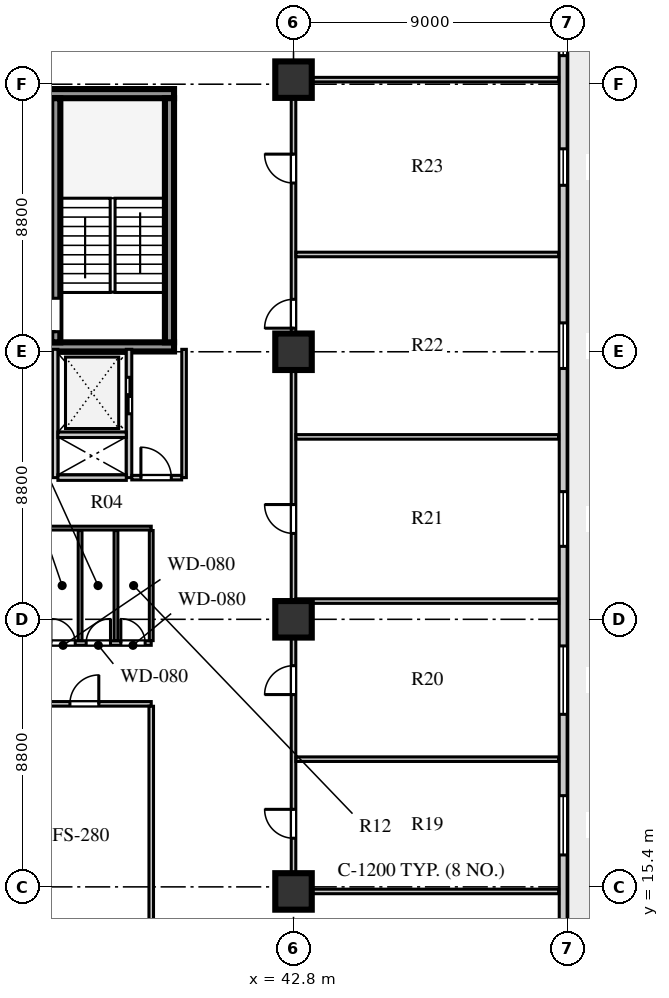
"""IFC4 building model, lengths in metres.
Left out: names, types, materials, properties, quantities, classifications, styles, units other than length and angle.
Written with IfcOpenShell. Run it as: python <this file> out.ifc"""

import sys

from ifc_helpers import new_model, si_unit, direction, frame, frame_2d, origin, origin_2d, place, context, subcontext, project, spatial, rectangle, extrude, element, fill, save


model = new_model("IFC4")
c1 = context("Model", 3, precision=1e-05, world=origin(), true_north=direction((0.0, 1.0)))
c2 = subcontext(c1, "Body", "Model", "MODEL_VIEW")
j1 = project(units=[si_unit("LENGTHUNIT", "METRE"), si_unit("PLANEANGLEUNIT", "RADIAN")], contexts=[c1])
p1 = place(None, origin())
s1 = spatial("IfcSite", under=j1, at=p1, CompositionType="ELEMENT")
p2 = place(p1, origin())
s2 = spatial("IfcBuilding", under=s1, at=p2, CompositionType="ELEMENT")
p3 = place(p2, frame((0.0, 0.0, 58.0)))
s3 = spatial("IfcBuildingStorey", under=s2, at=p3, CompositionType="ELEMENT", Elevation=58.0)
for number, where, z_axis, x_axis in (
    (1, (34.4, 33.16, 0.0), (0.0, 0.0, 1.0), (1.0, 0.0, 0.0)),
    (2, (34.4, 41.49, 0.0), (0.0, 0.0, 1.0), (1.0, 0.0, 0.0)),
):
    element("IfcWall", number, at=place(p3, frame(where, z_axis=z_axis, x_axis=x_axis)), inside=s3, PredefinedType="SHEAR", context=c2, shape_type="SweptSolid", body=[
        extrude(rectangle(XDim=4.47, YDim=0.3, at=frame_2d((2.235, 0.0))), origin(), (0.0, 0.0, 1.0), 3.72),
    ])
p4 = place(p3, frame((34.98, 33.31, 0.0), z_axis=(0.0, 0.0, 1.0), x_axis=(0.0, 1.0, 0.0)))
e3 = element("IfcWall", 3, at=p4, inside=s3, PredefinedType="SHEAR", context=c2, shape_type="SweptSolid", body=[
    extrude(rectangle(XDim=8.03, YDim=0.3, at=frame_2d((4.015, 0.0))), origin(), (0.0, 0.0, 1.0), 3.72),
])
p5 = place(p4, frame((0.35, 0.0, 0.0)))
e4 = element("IfcOpeningElement", 4, at=p5, cuts=e3, PredefinedType="OPENING", context=c2, shape_type="SweptSolid", body=[
    extrude(rectangle(XDim=1.1, YDim=2.1, at=frame_2d((0.55, 1.05))), frame((0.0, 0.16, 0.0), z_axis=(0.0, -1.0, 0.0), x_axis=(1.0, 0.0, 0.0)), (0.0, 0.0, 1.0), 0.32),
])
p6 = place(p3, frame((38.72, 33.31, 0.0), z_axis=(0.0, 0.0, 1.0), x_axis=(0.0, 1.0, 0.0)))
e5 = element("IfcWall", 5, at=p6, inside=s3, PredefinedType="SHEAR", context=c2, shape_type="SweptSolid", body=[
    extrude(rectangle(XDim=8.03, YDim=0.3, at=frame_2d((4.015, 0.0))), origin(), (0.0, 0.0, 1.0), 3.72),
])
for number, where, z_axis, x_axis in (
    (6, (42.8, 15.25, 0.0), (0.0, 0.0, 1.0), (1.0, 0.0, 0.0)),
    (7, (42.8, 24.2, 0.0), (0.0, 0.0, 1.0), (1.0, 0.0, 0.0)),
    (8, (42.8, 33.0, 0.0), (0.0, 0.0, 1.0), (1.0, 0.0, 0.0)),
    (9, (42.8, 41.95, 0.0), (0.0, 0.0, 1.0), (1.0, 0.0, 0.0)),
):
    element("IfcColumn", number, at=place(p3, frame(where, z_axis=z_axis, x_axis=x_axis)), inside=s3, PredefinedType="COLUMN", context=c2, shape_type="SweptSolid", body=[
        extrude(rectangle(XDim=1.2, YDim=1.2, at=origin_2d()), origin(), (0.0, 0.0, 1.0), 3.72),
    ])
p7 = place(p3, frame((51.67, 12.36, 0.0), z_axis=(0.0, 0.0, 1.0), x_axis=(0.0, 1.0, 0.0)))
e10 = element("IfcWall", 10, at=p7, inside=s3, PredefinedType="SOLIDWALL", context=c2, shape_type="SweptSolid", body=[
    extrude(rectangle(XDim=32.48, YDim=0.26, at=frame_2d((16.24, 0.0))), origin(), (0.0, 0.0, 1.0), 3.72),
])
p8 = place(p7, frame((0.69, 0.0, 0.0)))
e11 = element("IfcOpeningElement", 11, at=p8, cuts=e10, PredefinedType="OPENING", context=c2, shape_type="SweptSolid", body=[
    extrude(rectangle(XDim=1.0, YDim=2.05, at=frame_2d((0.5, 1.025))), frame((0.0, 0.14, 0.0), z_axis=(0.0, -1.0, 0.0), x_axis=(1.0, 0.0, 0.0)), (0.0, 0.0, 1.0), 0.28),
])
p9 = place(p7, frame((4.09, 0.0, 0.8)))
e12 = element("IfcOpeningElement", 12, at=p9, cuts=e10, PredefinedType="OPENING", context=c2, shape_type="SweptSolid", body=[
    extrude(rectangle(XDim=1.95, YDim=2.0, at=frame_2d((0.975, 1.0))), frame((0.0, 0.14, 0.0), z_axis=(0.0, -1.0, 0.0), x_axis=(1.0, 0.0, 0.0)), (0.0, 0.0, 1.0), 0.28),
])
p10 = place(p7, frame((8.715, 0.0, 0.8)))
e13 = element("IfcOpeningElement", 13, at=p10, cuts=e10, PredefinedType="OPENING", context=c2, shape_type="SweptSolid", body=[
    extrude(rectangle(XDim=2.25, YDim=2.0, at=frame_2d((1.125, 1.0))), frame((0.0, 0.14, 0.0), z_axis=(0.0, -1.0, 0.0), x_axis=(1.0, 0.0, 0.0)), (0.0, 0.0, 1.0), 0.28),
])
p11 = place(p7, frame((14.24, 0.0, 0.8)))
e14 = element("IfcOpeningElement", 14, at=p11, cuts=e10, PredefinedType="OPENING", context=c2, shape_type="SweptSolid", body=[
    extrude(rectangle(XDim=1.8, YDim=2.0, at=frame_2d((0.9, 1.0))), frame((0.0, 0.14, 0.0), z_axis=(0.0, -1.0, 0.0), x_axis=(1.0, 0.0, 0.0)), (0.0, 0.0, 1.0), 0.28),
])
p12 = place(p7, frame((20.09, 0.0, 0.8)))
e15 = element("IfcOpeningElement", 15, at=p12, cuts=e10, PredefinedType="OPENING", context=c2, shape_type="SweptSolid", body=[
    extrude(rectangle(XDim=1.5, YDim=2.0, at=frame_2d((0.75, 1.0))), frame((0.0, 0.14, 0.0), z_axis=(0.0, -1.0, 0.0), x_axis=(1.0, 0.0, 0.0)), (0.0, 0.0, 1.0), 0.28),
])
p13 = place(p7, frame((26.115, 0.0, 0.8)))
e16 = element("IfcOpeningElement", 16, at=p13, cuts=e10, PredefinedType="OPENING", context=c2, shape_type="SweptSolid", body=[
    extrude(rectangle(XDim=1.2, YDim=1.75, at=frame_2d((0.6, 0.875))), frame((0.0, 0.14, 0.0), z_axis=(0.0, -1.0, 0.0), x_axis=(1.0, 0.0, 0.0)), (0.0, 0.0, 1.0), 0.28),
])
p14 = place(p7, frame((30.38, 0.0, 0.8)))
e17 = element("IfcOpeningElement", 17, at=p14, cuts=e10, PredefinedType="OPENING", context=c2, shape_type="SweptSolid", body=[
    extrude(rectangle(XDim=1.2, YDim=1.75, at=frame_2d((0.6, 0.875))), frame((0.0, 0.14, 0.0), z_axis=(0.0, -1.0, 0.0), x_axis=(1.0, 0.0, 0.0)), (0.0, 0.0, 1.0), 0.28),
])
p15 = place(p3, frame((34.96, 28.86, 0.0), z_axis=(0.0, 0.0, 1.0), x_axis=(0.0, 1.0, 0.0)))
e18 = element("IfcWall", 18, at=p15, inside=s3, PredefinedType="SOLIDWALL", context=c2, shape_type="SweptSolid", body=[
    extrude(rectangle(XDim=4.22, YDim=0.18, at=frame_2d((2.11, 0.0))), origin(), (0.0, 0.0, 1.0), 3.72),
])
p16 = place(p3, frame((37.39, 28.86, 0.0), z_axis=(0.0, 0.0, 1.0), x_axis=(0.0, 1.0, 0.0)))
e19 = element("IfcWall", 19, at=p16, inside=s3, PredefinedType="SOLIDWALL", context=c2, shape_type="SweptSolid", body=[
    extrude(rectangle(XDim=4.22, YDim=0.18, at=frame_2d((2.11, 0.0))), origin(), (0.0, 0.0, 1.0), 3.72),
])
p17 = place(p16, frame((2.1, 0.0, 0.0)))
e20 = element("IfcOpeningElement", 20, at=p17, cuts=e19, PredefinedType="OPENING", context=c2, shape_type="SweptSolid", body=[
    extrude(rectangle(XDim=1.2, YDim=2.12, at=frame_2d((0.6, 1.06))), frame((0.0, 0.1, 0.0), z_axis=(0.0, -1.0, 0.0), x_axis=(1.0, 0.0, 0.0)), (0.0, 0.0, 1.0), 0.2),
])
for number, where, z_axis, x_axis in (
    (21, (35.05, 28.86, 0.0), (0.0, 0.0, 1.0), (1.0, 0.0, 0.0)),
    (22, (35.05, 30.27, 0.0), (0.0, 0.0, 1.0), (1.0, 0.0, 0.0)),
):
    element("IfcWall", number, at=place(p3, frame(where, z_axis=z_axis, x_axis=x_axis)), inside=s3, PredefinedType="SOLIDWALL", context=c2, shape_type="SweptSolid", body=[
        extrude(rectangle(XDim=2.25, YDim=0.18, at=frame_2d((1.125, 0.0))), origin(), (0.0, 0.0, 1.0), 3.72),
    ])
p18 = place(p3, frame((39.2, 28.86, 0.0), z_axis=(0.0, 0.0, 1.0), x_axis=(0.0, 1.0, 0.0)))
e23 = element("IfcWall", 23, at=p18, inside=s3, PredefinedType="PARTITIONING", context=c2, shape_type="SweptSolid", body=[
    extrude(rectangle(XDim=4.22, YDim=0.15, at=frame_2d((2.11, 0.0))), origin(), (0.0, 0.0, 1.0), 3.72),
])
p19 = place(p3, frame((37.48, 28.86, 0.0), z_axis=(0.0, 0.0, 1.0), x_axis=(1.0, 0.0, 0.0)))
e24 = element("IfcWall", 24, at=p19, inside=s3, PredefinedType="PARTITIONING", context=c2, shape_type="SweptSolid", body=[
    extrude(rectangle(XDim=1.64, YDim=0.15, at=frame_2d((0.82, 0.0))), origin(), (0.0, 0.0, 1.0), 3.72),
])
p20 = place(p19, frame((0.3, 0.0, 0.0)))
e25 = element("IfcOpeningElement", 25, at=p20, cuts=e24, PredefinedType="OPENING", context=c2, shape_type="SweptSolid", body=[
    extrude(rectangle(XDim=1.0, YDim=2.1, at=frame_2d((0.5, 1.05))), frame((0.0, 0.085, 0.0), z_axis=(0.0, -1.0, 0.0), x_axis=(1.0, 0.0, 0.0)), (0.0, 0.0, 1.0), 0.17),
])
p21 = place(p3, frame((25.25, 21.42, 0.0), z_axis=(0.0, 0.0, 1.0), x_axis=(1.0, 0.0, 0.0)))
e26 = element("IfcWall", 26, at=p21, inside=s3, PredefinedType="PARTITIONING", context=c2, shape_type="SweptSolid", body=[
    extrude(rectangle(XDim=12.87, YDim=0.15, at=frame_2d((6.435, 0.0))), origin(), (0.0, 0.0, 1.0), 3.32),
])
p22 = place(p21, frame((1.525, 0.0, 0.0)))
e27 = element("IfcOpeningElement", 27, at=p22, cuts=e26, PredefinedType="OPENING", context=c2, shape_type="SweptSolid", body=[
    extrude(rectangle(XDim=0.95, YDim=2.08, at=frame_2d((0.475, 1.04))), frame((0.0, 0.085, 0.0), z_axis=(0.0, -1.0, 0.0), x_axis=(1.0, 0.0, 0.0)), (0.0, 0.0, 1.0), 0.17),
])
p23 = place(p21, frame((5.775, 0.0, 0.0)))
e28 = element("IfcOpeningElement", 28, at=p23, cuts=e26, PredefinedType="OPENING", context=c2, shape_type="SweptSolid", body=[
    extrude(rectangle(XDim=0.95, YDim=2.08, at=frame_2d((0.475, 1.04))), frame((0.0, 0.085, 0.0), z_axis=(0.0, -1.0, 0.0), x_axis=(1.0, 0.0, 0.0)), (0.0, 0.0, 1.0), 0.17),
])
p24 = place(p21, frame((10.195, 0.0, 0.0)))
e29 = element("IfcOpeningElement", 29, at=p24, cuts=e26, PredefinedType="OPENING", context=c2, shape_type="SweptSolid", body=[
    extrude(rectangle(XDim=0.95, YDim=2.08, at=frame_2d((0.475, 1.04))), frame((0.0, 0.085, 0.0), z_axis=(0.0, -1.0, 0.0), x_axis=(1.0, 0.0, 0.0)), (0.0, 0.0, 1.0), 0.17),
])
p25 = place(p3, frame((38.12, 6.88, 0.0), z_axis=(0.0, 0.0, 1.0), x_axis=(0.0, 1.0, 0.0)))
e30 = element("IfcWall", 30, at=p25, inside=s3, PredefinedType="PARTITIONING", context=c2, shape_type="SweptSolid", body=[
    extrude(rectangle(XDim=14.46, YDim=0.15, at=frame_2d((7.23, 0.0))), origin(), (0.0, 0.0, 1.0), 3.72),
])
p26 = place(p3, frame((34.6, 23.42, 0.0), z_axis=(0.0, 0.0, 1.0), x_axis=(1.0, 0.0, 0.0)))
e31 = element("IfcWall", 31, at=p26, inside=s3, PredefinedType="PARTITIONING", context=c2, shape_type="SweptSolid", body=[
    extrude(rectangle(XDim=3.52, YDim=0.15, at=frame_2d((1.76, 0.0))), origin(), (0.0, 0.0, 1.0), 3.72),
])
p27 = place(p26, frame((0.22, 0.0, 0.0)))
e32 = element("IfcOpeningElement", 32, at=p27, cuts=e31, PredefinedType="OPENING", context=c2, shape_type="SweptSolid", body=[
    extrude(rectangle(XDim=0.8, YDim=2.05, at=frame_2d((0.4, 1.025))), frame((0.0, 0.085, 0.0), z_axis=(0.0, -1.0, 0.0), x_axis=(1.0, 0.0, 0.0)), (0.0, 0.0, 1.0), 0.17),
])
p28 = place(p26, frame((1.38, 0.0, 0.0)))
e33 = element("IfcOpeningElement", 33, at=p28, cuts=e31, PredefinedType="OPENING", context=c2, shape_type="SweptSolid", body=[
    extrude(rectangle(XDim=0.8, YDim=2.05, at=frame_2d((0.4, 1.025))), frame((0.0, 0.085, 0.0), z_axis=(0.0, -1.0, 0.0), x_axis=(1.0, 0.0, 0.0)), (0.0, 0.0, 1.0), 0.17),
])
p29 = place(p26, frame((2.52, 0.0, 0.0)))
e34 = element("IfcOpeningElement", 34, at=p29, cuts=e31, PredefinedType="OPENING", context=c2, shape_type="SweptSolid", body=[
    extrude(rectangle(XDim=0.8, YDim=2.05, at=frame_2d((0.4, 1.025))), frame((0.0, 0.085, 0.0), z_axis=(0.0, -1.0, 0.0), x_axis=(1.0, 0.0, 0.0)), (0.0, 0.0, 1.0), 0.17),
])
p30 = place(p3, frame((42.8, 15.25, 0.0), z_axis=(0.0, 0.0, 1.0), x_axis=(0.0, 1.0, 0.0)))
e35 = element("IfcWall", 35, at=p30, inside=s3, PredefinedType="PARTITIONING", context=c2, shape_type="SweptSolid", body=[
    extrude(rectangle(XDim=26.7, YDim=0.15, at=frame_2d((13.35, 0.0))), origin(), (0.0, 0.0, 1.0), 3.02),
])
p31 = place(p30, frame((1.75, 0.0, 0.0)))
e36 = element("IfcOpeningElement", 36, at=p31, cuts=e35, PredefinedType="OPENING", context=c2, shape_type="SweptSolid", body=[
    extrude(rectangle(XDim=0.95, YDim=2.08, at=frame_2d((0.475, 1.04))), frame((0.0, 0.085, 0.0), z_axis=(0.0, -1.0, 0.0), x_axis=(1.0, 0.0, 0.0)), (0.0, 0.0, 1.0), 0.17),
])
p32 = place(p30, frame((6.475, 0.0, 0.0)))
e37 = element("IfcOpeningElement", 37, at=p32, cuts=e35, PredefinedType="OPENING", context=c2, shape_type="SweptSolid", body=[
    extrude(rectangle(XDim=0.95, YDim=2.08, at=frame_2d((0.475, 1.04))), frame((0.0, 0.085, 0.0), z_axis=(0.0, -1.0, 0.0), x_axis=(1.0, 0.0, 0.0)), (0.0, 0.0, 1.0), 0.17),
])
p33 = place(p30, frame((11.775, 0.0, 0.0)))
e38 = element("IfcOpeningElement", 38, at=p33, cuts=e35, PredefinedType="OPENING", context=c2, shape_type="SweptSolid", body=[
    extrude(rectangle(XDim=0.95, YDim=2.08, at=frame_2d((0.475, 1.04))), frame((0.0, 0.085, 0.0), z_axis=(0.0, -1.0, 0.0), x_axis=(1.0, 0.0, 0.0)), (0.0, 0.0, 1.0), 0.17),
])
p34 = place(p30, frame((18.525, 0.0, 0.0)))
e39 = element("IfcOpeningElement", 39, at=p34, cuts=e35, PredefinedType="OPENING", context=c2, shape_type="SweptSolid", body=[
    extrude(rectangle(XDim=0.95, YDim=2.08, at=frame_2d((0.475, 1.04))), frame((0.0, 0.085, 0.0), z_axis=(0.0, -1.0, 0.0), x_axis=(1.0, 0.0, 0.0)), (0.0, 0.0, 1.0), 0.17),
])
p35 = place(p30, frame((23.3, 0.0, 0.0)))
e40 = element("IfcOpeningElement", 40, at=p35, cuts=e35, PredefinedType="OPENING", context=c2, shape_type="SweptSolid", body=[
    extrude(rectangle(XDim=0.95, YDim=2.08, at=frame_2d((0.475, 1.04))), frame((0.0, 0.085, 0.0), z_axis=(0.0, -1.0, 0.0), x_axis=(1.0, 0.0, 0.0)), (0.0, 0.0, 1.0), 0.17),
])
for number, where, z_axis, x_axis in (
    (41, (42.88, 15.25, 0.0), (0.0, 0.0, 1.0), (1.0, 0.0, 0.0)),
    (42, (42.88, 41.95, 0.0), (0.0, 0.0, 1.0), (1.0, 0.0, 0.0)),
):
    element("IfcWall", number, at=place(p3, frame(where, z_axis=z_axis, x_axis=x_axis)), inside=s3, PredefinedType="PARTITIONING", context=c2, shape_type="SweptSolid", body=[
        extrude(rectangle(XDim=8.64, YDim=0.15, at=frame_2d((4.32, 0.0))), origin(), (0.0, 0.0, 1.0), 3.22),
    ])
p36 = place(p3, frame((34.6, 27.2, 0.0), z_axis=(0.0, 0.0, 1.0), x_axis=(1.0, 0.0, 0.0)))
e43 = element("IfcWall", 43, at=p36, inside=s3, PredefinedType="PLUMBINGWALL", context=c2, shape_type="SweptSolid", body=[
    extrude(rectangle(XDim=3.52, YDim=0.125, at=frame_2d((1.76, 0.0))), origin(), (0.0, 0.0, 1.0), 3.32),
])
for number, where, z_axis, x_axis in (
    (44, (38.12, 23.5, 0.0), (0.0, 0.0, 1.0), (0.0, 1.0, 0.0)),
    (45, (35.78, 23.5, 0.0), (0.0, 0.0, 1.0), (0.0, 1.0, 0.0)),
    (46, (36.96, 23.5, 0.0), (0.0, 0.0, 1.0), (0.0, 1.0, 0.0)),
):
    element("IfcWall", number, at=place(p3, frame(where, z_axis=z_axis, x_axis=x_axis)), inside=s3, PredefinedType="PLUMBINGWALL", context=c2, shape_type="SweptSolid", body=[
        extrude(rectangle(XDim=3.62, YDim=0.125, at=frame_2d((1.81, 0.0))), origin(), (0.0, 0.0, 1.0), 3.72),
    ])
for number, where, z_axis, x_axis in (
    (47, (42.88, 19.6, 0.0), (0.0, 0.0, 1.0), (1.0, 0.0, 0.0)),
    (48, (42.88, 24.8, 0.0), (0.0, 0.0, 1.0), (1.0, 0.0, 0.0)),
    (49, (42.88, 30.2, 0.0), (0.0, 0.0, 1.0), (1.0, 0.0, 0.0)),
    (50, (42.88, 36.2, 0.0), (0.0, 0.0, 1.0), (1.0, 0.0, 0.0)),
):
    element("IfcWall", number, at=place(p3, frame(where, z_axis=z_axis, x_axis=x_axis)), inside=s3, PredefinedType="PARTITIONING", context=c2, shape_type="SweptSolid", body=[
        extrude(rectangle(XDim=8.64, YDim=0.15, at=frame_2d((4.32, 0.0))), origin(), (0.0, 0.0, 1.0), 3.72),
    ])
p37 = place(p9, origin())
e51 = element("IfcWindow", 51, at=p37, inside=s3, PartitioningType="SINGLE_PANEL", PredefinedType="WINDOW", context=c2, shape_type="SweptSolid", body=[
    extrude(rectangle(XDim=1.95, YDim=2.0, at=frame_2d((0.975, 1.0))), frame((0.0, 0.03, 0.0), z_axis=(0.0, -1.0, 0.0), x_axis=(1.0, 0.0, 0.0)), (0.0, 0.0, 1.0), 0.06),
])
fill(e12, e51)
p38 = place(p10, origin())
e52 = element("IfcWindow", 52, at=p38, inside=s3, PartitioningType="SINGLE_PANEL", PredefinedType="WINDOW", context=c2, shape_type="SweptSolid", body=[
    extrude(rectangle(XDim=2.25, YDim=2.0, at=frame_2d((1.125, 1.0))), frame((0.0, 0.03, 0.0), z_axis=(0.0, -1.0, 0.0), x_axis=(1.0, 0.0, 0.0)), (0.0, 0.0, 1.0), 0.06),
])
fill(e13, e52)
p39 = place(p11, origin())
e53 = element("IfcWindow", 53, at=p39, inside=s3, PartitioningType="SINGLE_PANEL", PredefinedType="WINDOW", context=c2, shape_type="SweptSolid", body=[
    extrude(rectangle(XDim=1.8, YDim=2.0, at=frame_2d((0.9, 1.0))), frame((0.0, 0.03, 0.0), z_axis=(0.0, -1.0, 0.0), x_axis=(1.0, 0.0, 0.0)), (0.0, 0.0, 1.0), 0.06),
])
fill(e14, e53)
p40 = place(p12, origin())
e54 = element("IfcWindow", 54, at=p40, inside=s3, PartitioningType="SINGLE_PANEL", PredefinedType="WINDOW", context=c2, shape_type="SweptSolid", body=[
    extrude(rectangle(XDim=1.5, YDim=2.0, at=frame_2d((0.75, 1.0))), frame((0.0, 0.03, 0.0), z_axis=(0.0, -1.0, 0.0), x_axis=(1.0, 0.0, 0.0)), (0.0, 0.0, 1.0), 0.06),
])
fill(e15, e54)
p41 = place(p13, origin())
e55 = element("IfcWindow", 55, at=p41, inside=s3, PartitioningType="SINGLE_PANEL", PredefinedType="WINDOW", context=c2, shape_type="SweptSolid", body=[
    extrude(rectangle(XDim=1.2, YDim=1.75, at=frame_2d((0.6, 0.875))), frame((0.0, 0.03, 0.0), z_axis=(0.0, -1.0, 0.0), x_axis=(1.0, 0.0, 0.0)), (0.0, 0.0, 1.0), 0.06),
])
fill(e16, e55)
p42 = place(p14, origin())
e56 = element("IfcWindow", 56, at=p42, inside=s3, PartitioningType="SINGLE_PANEL", PredefinedType="WINDOW", context=c2, shape_type="SweptSolid", body=[
    extrude(rectangle(XDim=1.2, YDim=1.75, at=frame_2d((0.6, 0.875))), frame((0.0, 0.03, 0.0), z_axis=(0.0, -1.0, 0.0), x_axis=(1.0, 0.0, 0.0)), (0.0, 0.0, 1.0), 0.06),
])
fill(e17, e56)
p43 = place(p5, origin())
e57 = element("IfcDoor", 57, at=p43, inside=s3, OperationType="SINGLE_SWING_LEFT", PredefinedType="DOOR", context=c2, shape_type="SweptSolid", body=[
    extrude(rectangle(XDim=1.1, YDim=2.1, at=frame_2d((0.55, 1.05))), frame((0.0, 0.025, 0.0), z_axis=(0.0, -1.0, 0.0), x_axis=(1.0, 0.0, 0.0)), (0.0, 0.0, 1.0), 0.05),
])
fill(e4, e57)
p44 = place(p17, frame((1.2, 0.0, 0.0), z_axis=(0.0, 0.0, 1.0), x_axis=(-1.0, 0.0, 0.0)))
e58 = element("IfcDoor", 58, at=p44, inside=s3, OperationType="DOUBLE_DOOR_SLIDING", PredefinedType="DOOR", context=c2, shape_type="SweptSolid", body=[
    extrude(rectangle(XDim=1.2, YDim=2.12, at=frame_2d((0.6, 1.06))), frame((0.0, 0.025, 0.0), z_axis=(0.0, -1.0, 0.0), x_axis=(1.0, 0.0, 0.0)), (0.0, 0.0, 1.0), 0.05),
])
fill(e20, e58)
p45 = place(p20, origin())
e59 = element("IfcDoor", 59, at=p45, inside=s3, OperationType="SINGLE_SWING_LEFT", PredefinedType="DOOR", context=c2, shape_type="SweptSolid", body=[
    extrude(rectangle(XDim=1.0, YDim=2.1, at=frame_2d((0.5, 1.05))), frame((0.0, 0.025, 0.0), z_axis=(0.0, -1.0, 0.0), x_axis=(1.0, 0.0, 0.0)), (0.0, 0.0, 1.0), 0.05),
])
fill(e25, e59)
p46 = place(p27, origin())
e60 = element("IfcDoor", 60, at=p46, inside=s3, OperationType="SINGLE_SWING_LEFT", PredefinedType="DOOR", context=c2, shape_type="SweptSolid", body=[
    extrude(rectangle(XDim=0.8, YDim=2.05, at=frame_2d((0.4, 1.025))), frame((0.0, 0.025, 0.0), z_axis=(0.0, -1.0, 0.0), x_axis=(1.0, 0.0, 0.0)), (0.0, 0.0, 1.0), 0.05),
])
fill(e32, e60)
p47 = place(p28, origin())
e61 = element("IfcDoor", 61, at=p47, inside=s3, OperationType="SINGLE_SWING_RIGHT", PredefinedType="DOOR", context=c2, shape_type="SweptSolid", body=[
    extrude(rectangle(XDim=0.8, YDim=2.05, at=frame_2d((0.4, 1.025))), frame((0.0, 0.025, 0.0), z_axis=(0.0, -1.0, 0.0), x_axis=(1.0, 0.0, 0.0)), (0.0, 0.0, 1.0), 0.05),
])
fill(e33, e61)
p48 = place(p29, origin())
e62 = element("IfcDoor", 62, at=p48, inside=s3, OperationType="SINGLE_SWING_LEFT", PredefinedType="DOOR", context=c2, shape_type="SweptSolid", body=[
    extrude(rectangle(XDim=0.8, YDim=2.05, at=frame_2d((0.4, 1.025))), frame((0.0, 0.025, 0.0), z_axis=(0.0, -1.0, 0.0), x_axis=(1.0, 0.0, 0.0)), (0.0, 0.0, 1.0), 0.05),
])
fill(e34, e62)
p49 = place(p24, frame((0.95, 0.0, 0.0), z_axis=(0.0, 0.0, 1.0), x_axis=(-1.0, 0.0, 0.0)))
e63 = element("IfcDoor", 63, at=p49, inside=s3, OperationType="SINGLE_SWING_LEFT", PredefinedType="DOOR", context=c2, shape_type="SweptSolid", body=[
    extrude(rectangle(XDim=0.95, YDim=2.08, at=frame_2d((0.475, 1.04))), frame((0.0, 0.025, 0.0), z_axis=(0.0, -1.0, 0.0), x_axis=(1.0, 0.0, 0.0)), (0.0, 0.0, 1.0), 0.05),
])
fill(e29, e63)
p50 = place(p31, origin())
e64 = element("IfcDoor", 64, at=p50, inside=s3, OperationType="SINGLE_SWING_RIGHT", PredefinedType="DOOR", context=c2, shape_type="SweptSolid", body=[
    extrude(rectangle(XDim=0.95, YDim=2.08, at=frame_2d((0.475, 1.04))), frame((0.0, 0.025, 0.0), z_axis=(0.0, -1.0, 0.0), x_axis=(1.0, 0.0, 0.0)), (0.0, 0.0, 1.0), 0.05),
])
fill(e36, e64)
p51 = place(p32, origin())
e65 = element("IfcDoor", 65, at=p51, inside=s3, OperationType="SINGLE_SWING_LEFT", PredefinedType="DOOR", context=c2, shape_type="SweptSolid", body=[
    extrude(rectangle(XDim=0.95, YDim=2.08, at=frame_2d((0.475, 1.04))), frame((0.0, 0.025, 0.0), z_axis=(0.0, -1.0, 0.0), x_axis=(1.0, 0.0, 0.0)), (0.0, 0.0, 1.0), 0.05),
])
fill(e37, e65)
p52 = place(p33, origin())
e66 = element("IfcDoor", 66, at=p52, inside=s3, OperationType="SINGLE_SWING_RIGHT", PredefinedType="DOOR", context=c2, shape_type="SweptSolid", body=[
    extrude(rectangle(XDim=0.95, YDim=2.08, at=frame_2d((0.475, 1.04))), frame((0.0, 0.025, 0.0), z_axis=(0.0, -1.0, 0.0), x_axis=(1.0, 0.0, 0.0)), (0.0, 0.0, 1.0), 0.05),
])
fill(e38, e66)
p53 = place(p34, origin())
e67 = element("IfcDoor", 67, at=p53, inside=s3, OperationType="SINGLE_SWING_LEFT", PredefinedType="DOOR", context=c2, shape_type="SweptSolid", body=[
    extrude(rectangle(XDim=0.95, YDim=2.08, at=frame_2d((0.475, 1.04))), frame((0.0, 0.025, 0.0), z_axis=(0.0, -1.0, 0.0), x_axis=(1.0, 0.0, 0.0)), (0.0, 0.0, 1.0), 0.05),
])
fill(e39, e67)
p54 = place(p35, origin())
e68 = element("IfcDoor", 68, at=p54, inside=s3, OperationType="SINGLE_SWING_RIGHT", PredefinedType="DOOR", context=c2, shape_type="SweptSolid", body=[
    extrude(rectangle(XDim=0.95, YDim=2.08, at=frame_2d((0.475, 1.04))), frame((0.0, 0.025, 0.0), z_axis=(0.0, -1.0, 0.0), x_axis=(1.0, 0.0, 0.0)), (0.0, 0.0, 1.0), 0.05),
])
fill(e40, e68)
save(model, sys.argv[1])
